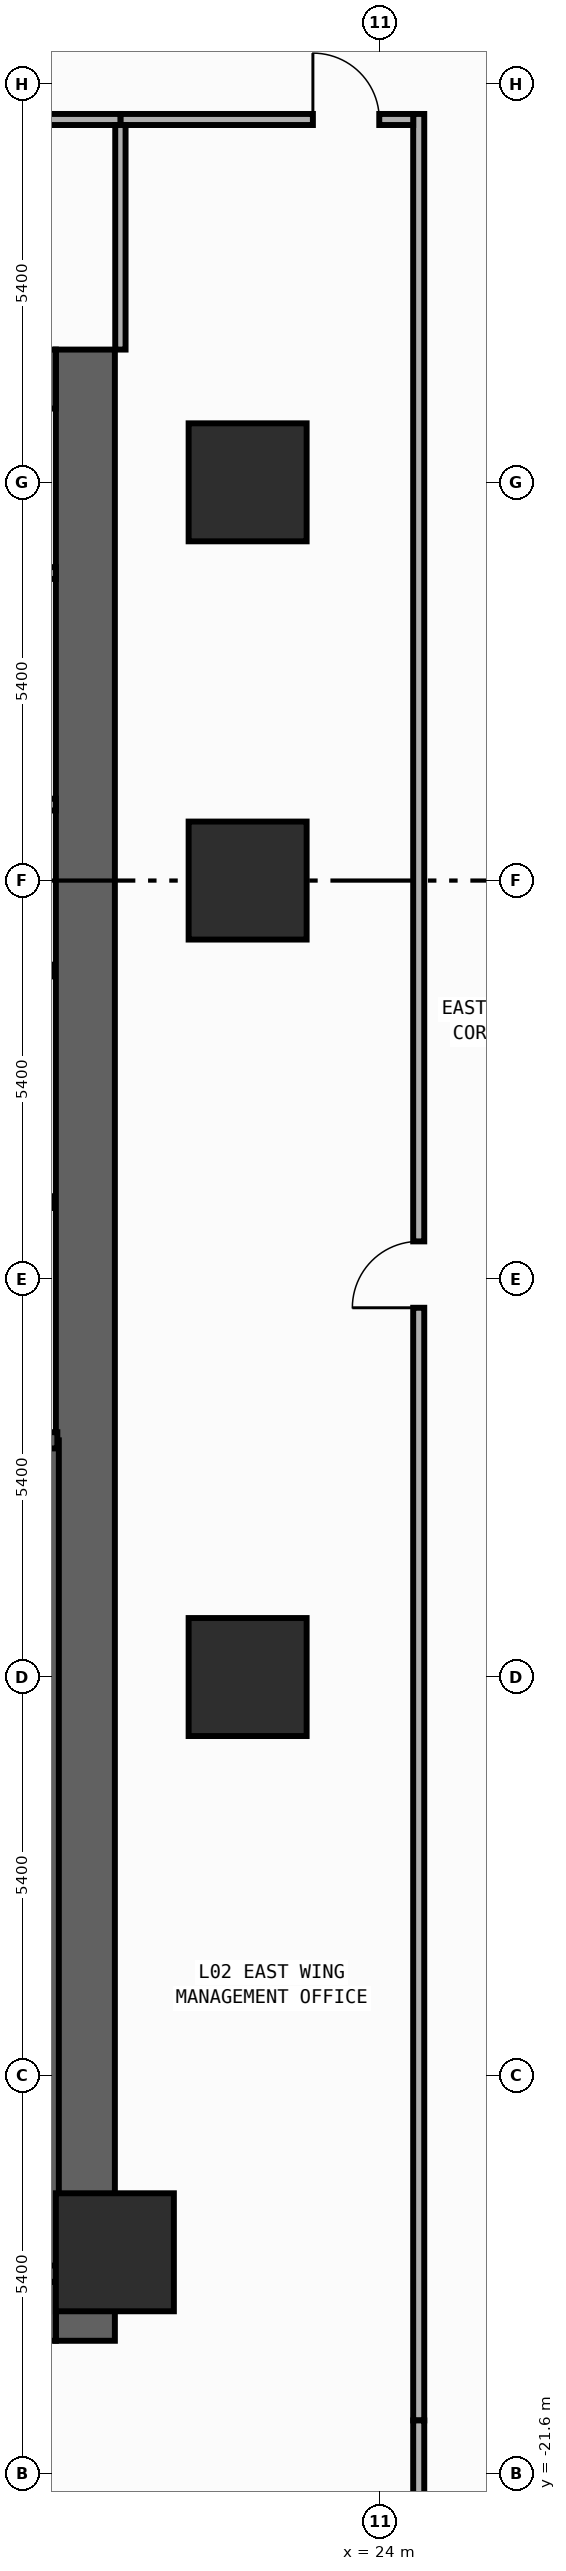
"""IFC4 building model, lengths in metres.
Left out: names, types, materials, properties, quantities, classifications, styles, units other than length and angle.
Written with IfcOpenShell. Run it as: python <this file> out.ifc"""

import sys

from ifc_helpers import new_model, si_unit, direction, frame, frame_2d, origin, origin_2d, place, context, subcontext, project, spatial, rectangle, extrude, element, fill, save


model = new_model("IFC4")
c1 = context("Model", 3, precision=1e-05, world=origin(), true_north=direction((0.0, 1.0)))
c2 = subcontext(c1, "Body", "Model", "MODEL_VIEW")
j1 = project(units=[si_unit("LENGTHUNIT", "METRE"), si_unit("PLANEANGLEUNIT", "RADIAN")], contexts=[c1])
p1 = place(None, origin())
s1 = spatial("IfcSite", under=j1, at=p1, CompositionType="ELEMENT")
p2 = place(p1, origin())
s2 = spatial("IfcBuilding", under=s1, at=p2, CompositionType="ELEMENT")
p3 = place(p2, frame((0.0, 0.0, 6.0)))
s3 = spatial("IfcBuildingStorey", under=s2, at=p3, CompositionType="ELEMENT", Elevation=6.0)
p4 = place(p3, frame((20.0, -19.8, 0.0), z_axis=(0.0, 0.0, 1.0), x_axis=(0.0, 1.0, 0.0)))
e1 = element("IfcWall", 1, at=p4, inside=s3, PredefinedType="SHEAR", context=c2, shape_type="SweptSolid", body=[
    extrude(rectangle(XDim=27.0, YDim=0.8, at=frame_2d((13.5, 0.0))), origin(), (0.0, 0.0, 1.0), 4.7),
])
for number, where, z_axis, x_axis in (
    (2, (12.8, -19.4, 0.0), (0.0, 0.0, 1.0), (1.0, 0.0, 0.0)),
    (3, (12.8, 6.8, 0.0), (0.0, 0.0, 1.0), (1.0, 0.0, 0.0)),
):
    element("IfcWall", number, at=place(p3, frame(where, z_axis=z_axis, x_axis=x_axis)), inside=s3, PredefinedType="SHEAR", context=c2, shape_type="SweptSolid", body=[
        extrude(rectangle(XDim=6.8, YDim=0.8, at=frame_2d((3.4, 0.0))), origin(), (0.0, 0.0, 1.0), 4.7),
    ])
p5 = place(p3, frame((19.53, -18.89, 0.0), z_axis=(0.0, 0.0, 1.0), x_axis=(0.0, 1.0, 0.0)))
e4 = element("IfcWall", 4, at=p5, inside=s3, PredefinedType="SHEAR", context=c2, shape_type="SweptSolid", body=[
    extrude(rectangle(XDim=11.3, YDim=0.22, at=frame_2d((5.65, 0.0))), origin(), (0.0, 0.0, 1.0), 4.7),
])
p6 = place(p3, frame((15.705, -18.89, 0.0), z_axis=(0.0, 0.0, 1.0), x_axis=(1.0, 0.0, 0.0)))
e5 = element("IfcWall", 5, at=p6, inside=s3, PredefinedType="SHEAR", context=c2, shape_type="SweptSolid", body=[
    extrude(rectangle(XDim=3.915, YDim=0.22, at=frame_2d((1.958, 0.0))), origin(), (0.0, 0.0, 1.0), 4.7),
])
p7 = place(p3, frame((19.62, -7.59, 0.0), z_axis=(0.0, 0.0, 1.0), x_axis=(-1.0, 0.0, 0.0)))
e6 = element("IfcWall", 6, at=p7, inside=s3, PredefinedType="SHEAR", context=c2, shape_type="SweptSolid", body=[
    extrude(rectangle(XDim=3.915, YDim=0.22, at=frame_2d((1.958, 0.0))), origin(), (0.0, 0.0, 1.0), 4.7),
])
p8 = place(p7, frame((1.08, 0.0, 0.0)))
e7 = element("IfcOpeningElement", 7, at=p8, cuts=e6, PredefinedType="OPENING", context=c2, shape_type="SweptSolid", body=[
    extrude(rectangle(XDim=1.1, YDim=2.2, at=frame_2d((0.55, 1.1))), frame((0.0, 0.12, 0.0), z_axis=(0.0, -1.0, 0.0), x_axis=(1.0, 0.0, 0.0)), (0.0, 0.0, 1.0), 0.24),
])
for number, where, z_axis, x_axis in (
    (8, (20.4, -18.6, 0.0), (0.0, 0.0, 1.0), (1.0, 0.0, 0.0)),
    (9, (22.2, -10.8, 0.0), (0.0, 0.0, 1.0), (1.0, 0.0, 0.0)),
    (10, (22.2, 0.0, 0.0), (0.0, 0.0, 1.0), (1.0, 0.0, 0.0)),
    (11, (22.2, 5.4, 0.0), (0.0, 0.0, 1.0), (1.0, 0.0, 0.0)),
):
    element("IfcColumn", number, at=place(p3, frame(where, z_axis=z_axis, x_axis=x_axis)), inside=s3, PredefinedType="COLUMN", context=c2, shape_type="SweptSolid", body=[
        extrude(rectangle(XDim=1.6, YDim=1.6, at=origin_2d()), origin(), (0.0, 0.0, 1.0), 5.0),
    ])
for number, where, z_axis, x_axis in (
    (12, (17.31, 4.17, 0.0), (0.0, 0.0, 1.0), (1.0, 0.0, 0.0)),
    (13, (17.31, 1.03, 0.0), (0.0, 0.0, 1.0), (1.0, 0.0, 0.0)),
):
    element("IfcWall", number, at=place(p3, frame(where, z_axis=z_axis, x_axis=x_axis)), inside=s3, PredefinedType="PARTITIONING", context=c2, shape_type="SweptSolid", body=[
        extrude(rectangle(XDim=2.29, YDim=0.16, at=frame_2d((1.145, 0.0))), origin(), (0.0, 0.0, 1.0), 4.7),
    ])
p9 = place(p3, frame((24.52, -20.88, 0.0), z_axis=(0.0, 0.0, 1.0), x_axis=(0.0, 1.0, 0.0)))
e14 = element("IfcWall", 14, at=p9, inside=s3, PredefinedType="PARTITIONING", context=c2, shape_type="SweptSolid", body=[
    extrude(rectangle(XDim=31.275, YDim=0.15, at=frame_2d((15.637, 0.0))), origin(), (0.0, 0.0, 1.0), 4.7),
])
p10 = place(p9, frame((15.087, 0.0, 0.0)))
e15 = element("IfcOpeningElement", 15, at=p10, cuts=e14, PredefinedType="OPENING", context=c2, shape_type="SweptSolid", body=[
    extrude(rectangle(XDim=0.9, YDim=2.15, at=frame_2d((0.45, 1.075))), frame((0.0, 0.085, 0.0), z_axis=(0.0, -1.0, 0.0), x_axis=(1.0, 0.0, 0.0)), (0.0, 0.0, 1.0), 0.17),
])
p11 = place(p3, frame((24.52, -27.413, 0.0), z_axis=(0.0, 0.0, 1.0), x_axis=(0.0, 1.0, 0.0)))
e16 = element("IfcWall", 16, at=p11, inside=s3, PredefinedType="PARTITIONING", context=c2, shape_type="SweptSolid", body=[
    extrude(rectangle(XDim=6.533, YDim=0.15, at=frame_2d((3.266, 0.0))), origin(), (0.0, 0.0, 1.0), 4.7),
])
p12 = place(p11, frame((3.943, 0.0, 0.0)))
e17 = element("IfcOpeningElement", 17, at=p12, cuts=e16, PredefinedType="OPENING", context=c2, shape_type="SweptSolid", body=[
    extrude(rectangle(XDim=0.9, YDim=2.15, at=frame_2d((0.45, 1.075))), frame((0.0, 0.085, 0.0), z_axis=(0.0, -1.0, 0.0), x_axis=(1.0, 0.0, 0.0)), (0.0, 0.0, 1.0), 0.17),
])
p13 = place(p3, frame((20.475, 10.32, 0.0), z_axis=(0.0, 0.0, 1.0), x_axis=(1.0, 0.0, 0.0)))
e18 = element("IfcWall", 18, at=p13, inside=s3, PredefinedType="PARTITIONING", context=c2, shape_type="SweptSolid", body=[
    extrude(rectangle(XDim=3.97, YDim=0.15, at=frame_2d((1.985, 0.0))), origin(), (0.0, 0.0, 1.0), 4.7),
])
p14 = place(p13, frame((2.61, 0.0, 0.0)))
e19 = element("IfcOpeningElement", 19, at=p14, cuts=e18, PredefinedType="OPENING", context=c2, shape_type="SweptSolid", body=[
    extrude(rectangle(XDim=0.9, YDim=2.15, at=frame_2d((0.45, 1.075))), frame((0.0, 0.085, 0.0), z_axis=(0.0, -1.0, 0.0), x_axis=(1.0, 0.0, 0.0)), (0.0, 0.0, 1.0), 0.17),
])
p15 = place(p3, frame((12.065, 10.32, 0.0), z_axis=(0.0, 0.0, 1.0), x_axis=(1.0, 0.0, 0.0)))
e20 = element("IfcWall", 20, at=p15, inside=s3, PredefinedType="PARTITIONING", context=c2, shape_type="SweptSolid", body=[
    extrude(rectangle(XDim=8.41, YDim=0.15, at=frame_2d((4.205, 0.0))), origin(), (0.0, 0.0, 1.0), 4.7),
])
p16 = place(p15, frame((4.785, 0.0, 0.0)))
e21 = element("IfcOpeningElement", 21, at=p16, cuts=e20, PredefinedType="OPENING", context=c2, shape_type="SweptSolid", body=[
    extrude(rectangle(XDim=0.9, YDim=2.15, at=frame_2d((0.45, 1.075))), frame((0.0, 0.085, 0.0), z_axis=(0.0, -1.0, 0.0), x_axis=(1.0, 0.0, 0.0)), (0.0, 0.0, 1.0), 0.17),
])
p17 = place(p3, frame((20.475, 7.2, 0.0), z_axis=(0.0, 0.0, 1.0), x_axis=(0.0, 1.0, 0.0)))
e22 = element("IfcWall", 22, at=p17, inside=s3, PredefinedType="PARTITIONING", context=c2, shape_type="SweptSolid", body=[
    extrude(rectangle(XDim=3.045, YDim=0.14, at=frame_2d((1.522, 0.0))), origin(), (0.0, 0.0, 1.0), 4.7),
])
p18 = place(p10, origin())
e23 = element("IfcDoor", 23, at=p18, inside=s3, OperationType="SINGLE_SWING_LEFT", PredefinedType="DOOR", context=c2, shape_type="SweptSolid", body=[
    extrude(rectangle(XDim=0.9, YDim=2.15, at=frame_2d((0.45, 1.075))), frame((0.0, 0.025, 0.0), z_axis=(0.0, -1.0, 0.0), x_axis=(1.0, 0.0, 0.0)), (0.0, 0.0, 1.0), 0.05),
])
fill(e15, e23)
p19 = place(p14, origin())
e24 = element("IfcDoor", 24, at=p19, inside=s3, OperationType="SINGLE_SWING_LEFT", PredefinedType="DOOR", context=c2, shape_type="SweptSolid", body=[
    extrude(rectangle(XDim=0.9, YDim=2.15, at=frame_2d((0.45, 1.075))), frame((0.0, 0.025, 0.0), z_axis=(0.0, -1.0, 0.0), x_axis=(1.0, 0.0, 0.0)), (0.0, 0.0, 1.0), 0.05),
])
fill(e19, e24)
save(model, sys.argv[1])
